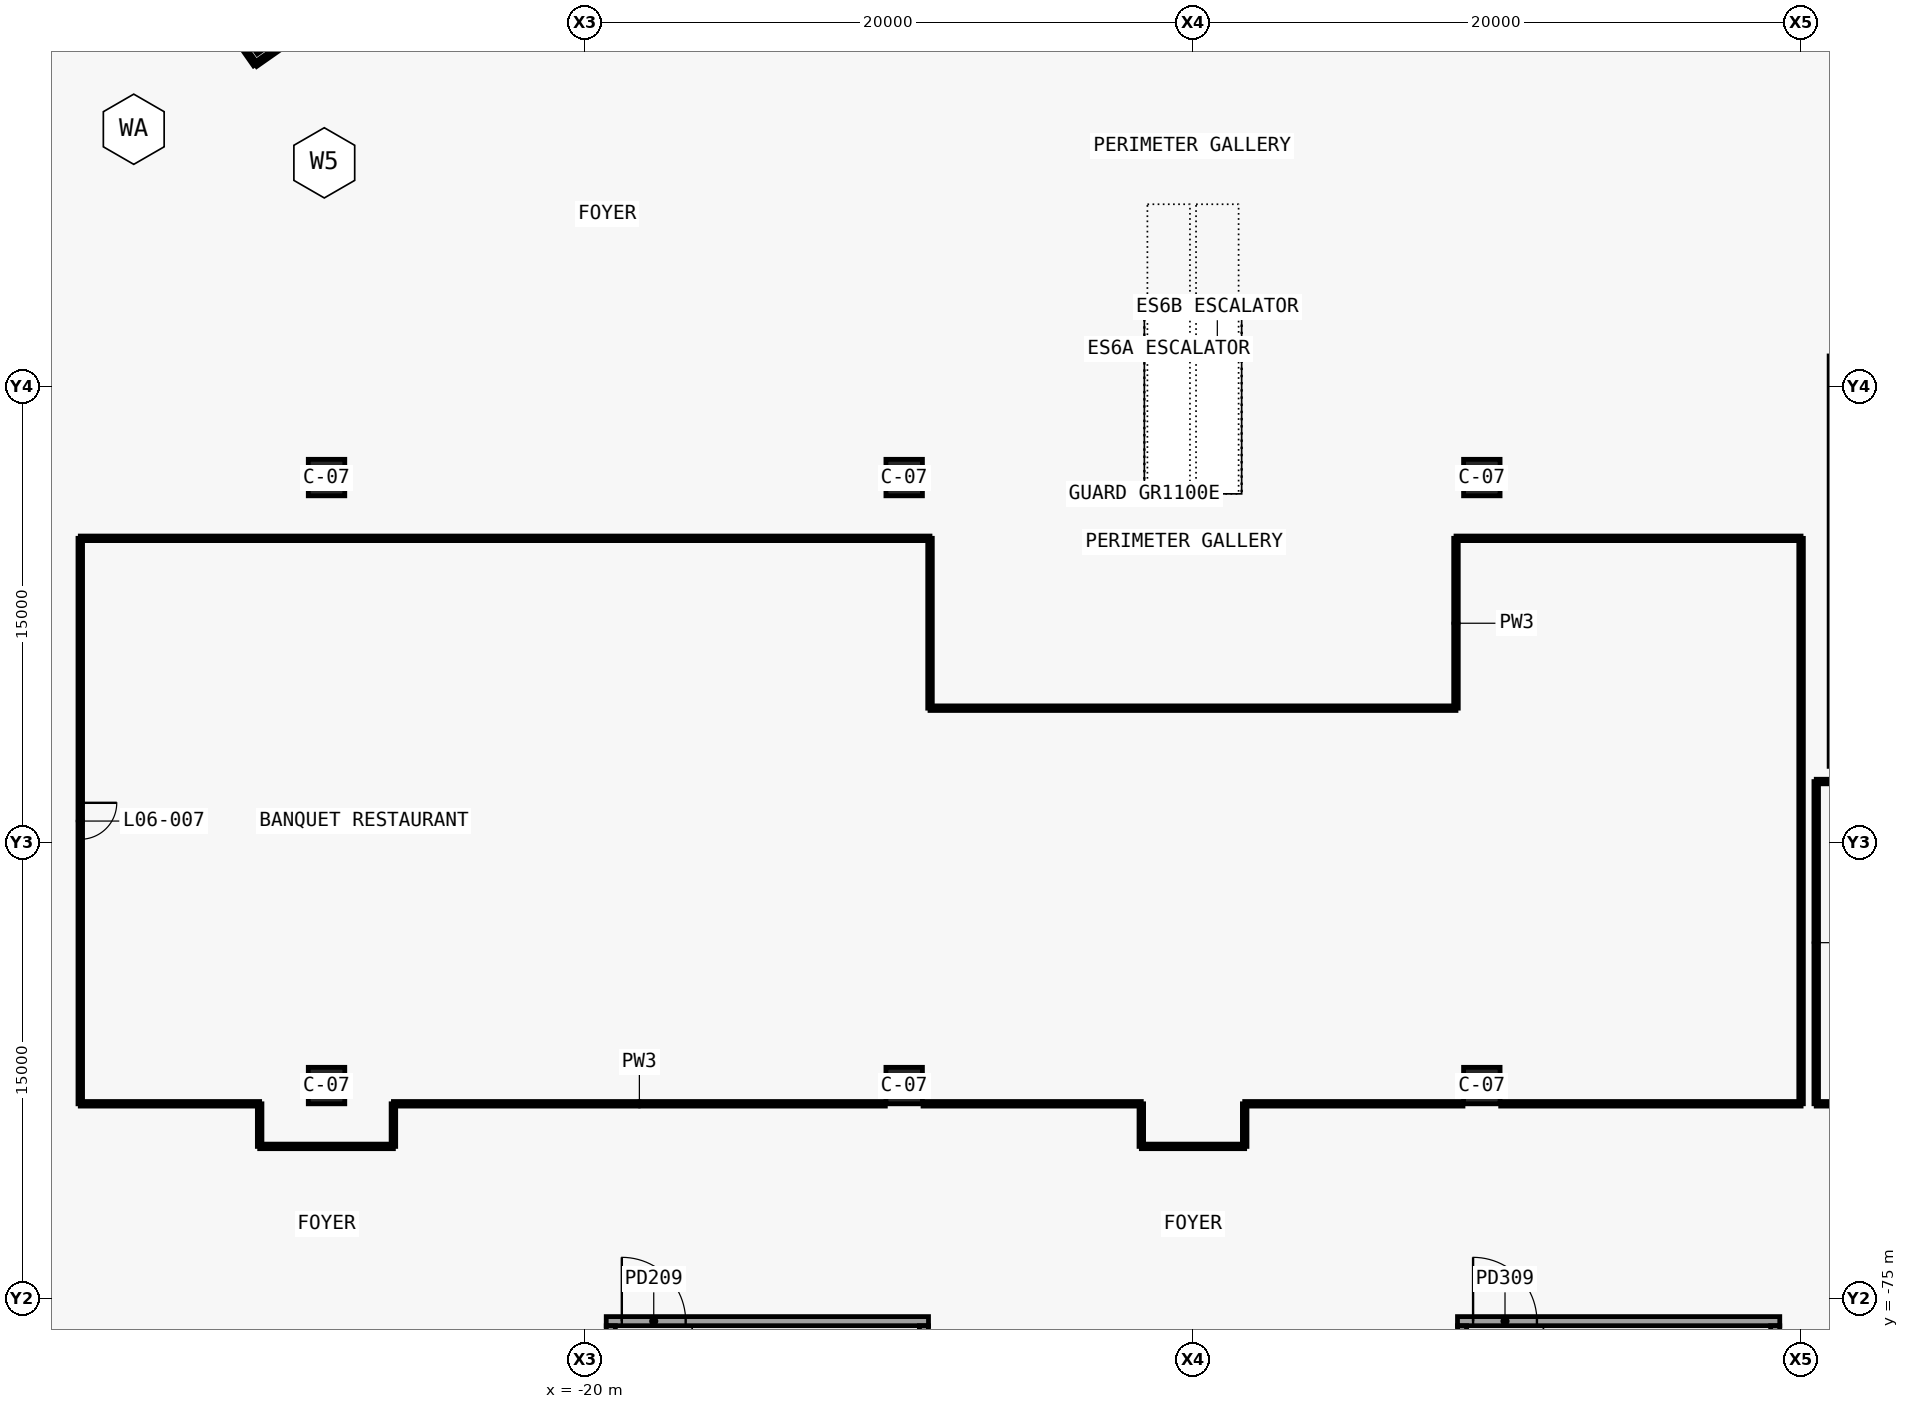
"""IFC4 building model, lengths in metres.
Left out: names, types, materials, properties, quantities, classifications, styles, units other than length and angle.
Written with IfcOpenShell. Run it as: python <this file> out.ifc"""

import sys

from ifc_helpers import new_model, si_unit, direction, frame, frame_2d, origin, origin_2d, place, context, subcontext, project, spatial, rectangle, extrude, element, fill, save


model = new_model("IFC4")
c1 = context("Model", 3, precision=1e-05, world=origin(), true_north=direction((0.0, 1.0)))
c2 = subcontext(c1, "Body", "Model", "MODEL_VIEW")
j1 = project(units=[si_unit("LENGTHUNIT", "METRE"), si_unit("PLANEANGLEUNIT", "RADIAN")], contexts=[c1])
p1 = place(None, origin())
s1 = spatial("IfcSite", under=j1, at=p1, CompositionType="ELEMENT")
p2 = place(p1, origin())
s2 = spatial("IfcBuilding", under=s1, at=p2, CompositionType="ELEMENT")
p3 = place(p2, frame((0.0, 0.0, 43.0)))
s3 = spatial("IfcBuildingStorey", under=s2, at=p3, CompositionType="ELEMENT", Elevation=43.0)
p4 = place(p3, frame((-19.3, -75.75, 0.0), z_axis=(0.0, 0.0, 1.0), x_axis=(1.0, 0.0, 0.0)))
e1 = element("IfcWall", 1, at=p4, inside=s3, PredefinedType="SOLIDWALL", context=c2, shape_type="SweptSolid", body=[
    extrude(rectangle(XDim=10.6, YDim=0.3, at=frame_2d((5.3, 0.0))), origin(), (0.0, 0.0, 1.0), 5.5),
])
p5 = place(p4, frame((0.512, 0.0, 0.0)))
e2 = element("IfcOpeningElement", 2, at=p5, cuts=e1, PredefinedType="OPENING", context=c2, shape_type="SweptSolid", body=[
    extrude(rectangle(XDim=2.1, YDim=2.1, at=frame_2d((1.05, 1.05))), frame((0.0, 0.16, 0.0), z_axis=(0.0, -1.0, 0.0), x_axis=(1.0, 0.0, 0.0)), (0.0, 0.0, 1.0), 0.32),
])
for number, where, z_axis, x_axis in (
    (3, (-19.15, -81.1, 0.0), (0.0, 0.0, 1.0), (0.0, 1.0, 0.0)),
    (4, (-8.85, -81.1, 0.0), (0.0, 0.0, 1.0), (0.0, 1.0, 0.0)),
):
    element("IfcWall", number, at=place(p3, frame(where, z_axis=z_axis, x_axis=x_axis)), inside=s3, PredefinedType="SOLIDWALL", context=c2, shape_type="SweptSolid", body=[
        extrude(rectangle(XDim=5.2, YDim=0.3, at=frame_2d((2.6, 0.0))), origin(), (0.0, 0.0, 1.0), 5.5),
    ])
p6 = place(p3, frame((8.7, -75.75, 0.0), z_axis=(0.0, 0.0, 1.0), x_axis=(1.0, 0.0, 0.0)))
e5 = element("IfcWall", 5, at=p6, inside=s3, PredefinedType="SOLIDWALL", context=c2, shape_type="SweptSolid", body=[
    extrude(rectangle(XDim=10.6, YDim=0.3, at=frame_2d((5.3, 0.0))), origin(), (0.0, 0.0, 1.0), 5.5),
])
p7 = place(p6, frame((0.512, 0.0, 0.0)))
e6 = element("IfcOpeningElement", 6, at=p7, cuts=e5, PredefinedType="OPENING", context=c2, shape_type="SweptSolid", body=[
    extrude(rectangle(XDim=2.1, YDim=2.1, at=frame_2d((1.05, 1.05))), frame((0.0, 0.16, 0.0), z_axis=(0.0, -1.0, 0.0), x_axis=(1.0, 0.0, 0.0)), (0.0, 0.0, 1.0), 0.32),
])
for number, where, z_axis, x_axis in (
    (7, (8.85, -81.1, 0.0), (0.0, 0.0, 1.0), (0.0, 1.0, 0.0)),
    (8, (19.15, -81.1, 0.0), (0.0, 0.0, 1.0), (0.0, 1.0, 0.0)),
):
    element("IfcWall", number, at=place(p3, frame(where, z_axis=z_axis, x_axis=x_axis)), inside=s3, PredefinedType="SOLIDWALL", context=c2, shape_type="SweptSolid", body=[
        extrude(rectangle(XDim=5.2, YDim=0.3, at=frame_2d((2.6, 0.0))), origin(), (0.0, 0.0, 1.0), 5.5),
    ])
p8 = place(p3, frame((-30.336, -33.388, 0.0), z_axis=(0.0, 0.0, 1.0), x_axis=(-0.819152044289, -0.573576436351, 0.0)))
e9 = element("IfcColumn", 9, at=p8, inside=s3, PredefinedType="COLUMN", context=c2, shape_type="SweptSolid", body=[
    extrude(rectangle(XDim=1.5, YDim=0.6, at=origin_2d()), origin(), (0.0, 0.0, 1.0), 5.5),
])
for number, where, z_axis, x_axis in (
    (10, (-28.5, -68.0, 0.0), (0.0, 0.0, 1.0), (1.0, 0.0, 0.0)),
    (11, (-9.5, -68.0, 0.0), (0.0, 0.0, 1.0), (1.0, 0.0, 0.0)),
    (12, (9.5, -68.0, 0.0), (0.0, 0.0, 1.0), (1.0, 0.0, 0.0)),
    (13, (-28.5, -48.0, 0.0), (0.0, 0.0, 1.0), (1.0, 0.0, 0.0)),
    (14, (-9.5, -48.0, 0.0), (0.0, 0.0, 1.0), (1.0, 0.0, 0.0)),
    (15, (9.5, -48.0, 0.0), (0.0, 0.0, 1.0), (1.0, 0.0, 0.0)),
):
    element("IfcColumn", number, at=place(p3, frame(where, z_axis=z_axis, x_axis=x_axis)), inside=s3, PredefinedType="COLUMN", context=c2, shape_type="SweptSolid", body=[
        extrude(rectangle(XDim=1.2, YDim=1.2, at=origin_2d()), origin(), (0.0, 0.0, 1.0), 5.5),
    ])
p9 = place(p3, frame((30.839, -34.412, 0.0), z_axis=(0.0, 0.0, 1.0), x_axis=(-0.819153188106, 0.573574802808, 0.0)))
e16 = element("IfcWall", 16, at=p9, inside=s3, PredefinedType="PARTITIONING", context=c2, shape_type="SweptSolid", body=[
    extrude(rectangle(XDim=25.351, YDim=0.15, at=frame_2d((12.675, 0.0))), origin(), (0.0, 0.0, 1.0), 4.08),
])
p10 = place(p3, frame((20.001, -68.599, 0.0), z_axis=(0.0, 0.0, 1.0), x_axis=(0.0, 1.0, 0.0)))
e17 = element("IfcWall", 17, at=p10, inside=s3, PredefinedType="PARTITIONING", context=c2, shape_type="SweptSolid", body=[
    extrude(rectangle(XDim=18.599, YDim=0.15, at=frame_2d((9.3, 0.0))), origin(), (0.0, 0.0, 1.0), 4.28),
])
p11 = place(p3, frame((20.0, -49.999, 0.0), z_axis=(0.0, 0.0, 1.0), x_axis=(-1.0, 0.0, 0.0)))
e18 = element("IfcWall", 18, at=p11, inside=s3, PredefinedType="PARTITIONING", context=c2, shape_type="SweptSolid", body=[
    extrude(rectangle(XDim=11.349, YDim=0.15, at=frame_2d((5.675, 0.0))), origin(), (0.0, 0.0, 1.0), 4.28),
])
p12 = place(p3, frame((-8.651, -49.999, 0.0), z_axis=(0.0, 0.0, 1.0), x_axis=(-1.0, 0.0, 0.0)))
e19 = element("IfcWall", 19, at=p12, inside=s3, PredefinedType="PARTITIONING", context=c2, shape_type="SweptSolid", body=[
    extrude(rectangle(XDim=27.948, YDim=0.15, at=frame_2d((13.974, 0.0))), origin(), (0.0, 0.0, 1.0), 4.28),
])
p13 = place(p3, frame((36.599, -57.999, 0.0), z_axis=(0.0, 0.0, 1.0), x_axis=(-1.0, 0.0, 0.0)))
e20 = element("IfcWall", 20, at=p13, inside=s3, PredefinedType="PARTITIONING", context=c2, shape_type="SweptSolid", body=[
    extrude(rectangle(XDim=16.099, YDim=0.15, at=frame_2d((8.05, 0.0))), origin(), (0.0, 0.0, 1.0), 4.28),
])
p14 = place(p3, frame((20.499, -58.0, 0.0), z_axis=(0.0, 0.0, 1.0), x_axis=(0.0, -1.0, 0.0)))
e21 = element("IfcWall", 21, at=p14, inside=s3, PredefinedType="PARTITIONING", context=c2, shape_type="SweptSolid", body=[
    extrude(rectangle(XDim=10.599, YDim=0.15, at=frame_2d((5.3, 0.0))), origin(), (0.0, 0.0, 1.0), 4.28),
])
p15 = place(p3, frame((20.999, -44.0, 0.0), z_axis=(0.0, 0.0, 1.0), x_axis=(0.0, -1.0, 0.0)))
e22 = element("IfcWall", 22, at=p15, inside=s3, PredefinedType="PARTITIONING", context=c2, shape_type="SweptSolid", body=[
    extrude(rectangle(XDim=13.5, YDim=0.15, at=frame_2d((6.75, 0.0))), origin(), (0.0, 0.0, 1.0), 4.28),
])
p16 = place(p3, frame((-32.56, -31.956, 0.0), z_axis=(0.0, 0.0, 1.0), x_axis=(0.573604390867, -0.819132469615, 0.0)))
e23 = element("IfcWall", 23, at=p16, inside=s3, PredefinedType="PARTITIONING", context=c2, shape_type="SweptSolid", body=[
    extrude(rectangle(XDim=2.999, YDim=0.15, at=frame_2d((1.5, 0.0))), origin(), (0.0, 0.0, 1.0), 4.4),
])
p17 = place(p3, frame((-30.839, -34.413, 0.0), z_axis=(0.0, 0.0, 1.0), x_axis=(0.819149083218, 0.573580665175, 0.0)))
e24 = element("IfcWall", 24, at=p17, inside=s3, PredefinedType="PARTITIONING", context=c2, shape_type="SweptSolid", body=[
    extrude(rectangle(XDim=18.002, YDim=0.15, at=frame_2d((9.001, 0.0))), origin(), (0.0, 0.0, 1.0), 5.1),
])
p18 = place(p3, frame((-1.699, -70.001, 0.0), z_axis=(0.0, 0.0, 1.0), x_axis=(1.0, 0.0, 0.0)))
e25 = element("IfcWall", 25, at=p18, inside=s3, PredefinedType="PARTITIONING", context=c2, shape_type="SweptSolid", body=[
    extrude(rectangle(XDim=3.398, YDim=0.15, at=frame_2d((1.699, 0.0))), origin(), (0.0, 0.0, 1.0), 5.1),
])
p19 = place(p3, frame((-30.699, -70.001, 0.0), z_axis=(0.0, 0.0, 1.0), x_axis=(1.0, 0.0, 0.0)))
e26 = element("IfcWall", 26, at=p19, inside=s3, PredefinedType="PARTITIONING", context=c2, shape_type="SweptSolid", body=[
    extrude(rectangle(XDim=4.398, YDim=0.15, at=frame_2d((2.199, 0.0))), origin(), (0.0, 0.0, 1.0), 4.28),
])
p20 = place(p3, frame((-36.6, -49.998, 0.0), z_axis=(0.0, 0.0, 1.0), x_axis=(0.0, -1.0, 0.0)))
e27 = element("IfcWall", 27, at=p20, inside=s3, PredefinedType="PARTITIONING", context=c2, shape_type="SweptSolid", body=[
    extrude(rectangle(XDim=18.602, YDim=0.15, at=frame_2d((9.301, 0.0))), origin(), (0.0, 0.0, 1.0), 4.28),
])
p21 = place(p20, frame((8.701, 0.0, 0.0)))
e28 = element("IfcOpeningElement", 28, at=p21, cuts=e27, PredefinedType="OPENING", context=c2, shape_type="SweptSolid", body=[
    extrude(rectangle(XDim=1.2, YDim=2.4, at=frame_2d((0.6, 1.2))), frame((0.0, 0.085, 0.0), z_axis=(0.0, -1.0, 0.0), x_axis=(1.0, 0.0, 0.0)), (0.0, 0.0, 1.0), 0.17),
])
p22 = place(p3, frame((-36.6, -68.6, 0.0), z_axis=(0.0, 0.0, 1.0), x_axis=(1.0, 0.0, 0.0)))
e29 = element("IfcWall", 29, at=p22, inside=s3, PredefinedType="PARTITIONING", context=c2, shape_type="SweptSolid", body=[
    extrude(rectangle(XDim=5.9, YDim=0.15, at=frame_2d((2.95, 0.0))), origin(), (0.0, 0.0, 1.0), 5.1),
])
for number, where, z_axis, x_axis in (
    (30, (-30.7, -68.6, 0.0), (0.0, 0.0, 1.0), (0.0, -1.0, 0.0)),
    (31, (-26.3, -70.002, 0.0), (0.0, 0.0, 1.0), (0.0, 1.0, 0.0)),
):
    element("IfcWall", number, at=place(p3, frame(where, z_axis=z_axis, x_axis=x_axis)), inside=s3, PredefinedType="PARTITIONING", context=c2, shape_type="SweptSolid", body=[
        extrude(rectangle(XDim=1.402, YDim=0.15, at=frame_2d((0.701, 0.0))), origin(), (0.0, 0.0, 1.0), 5.1),
    ])
p23 = place(p3, frame((-26.3, -68.6, 0.0), z_axis=(0.0, 0.0, 1.0), x_axis=(1.0, 0.0, 0.0)))
e32 = element("IfcWall", 32, at=p23, inside=s3, PredefinedType="PARTITIONING", context=c2, shape_type="SweptSolid", body=[
    extrude(rectangle(XDim=16.18, YDim=0.15, at=frame_2d((8.09, 0.0))), origin(), (0.0, 0.0, 1.0), 5.1),
])
p24 = place(p3, frame((-8.88, -68.6, 0.0), z_axis=(0.0, 0.0, 1.0), x_axis=(1.0, 0.0, 0.0)))
e33 = element("IfcWall", 33, at=p24, inside=s3, PredefinedType="PARTITIONING", context=c2, shape_type="SweptSolid", body=[
    extrude(rectangle(XDim=7.18, YDim=0.15, at=frame_2d((3.59, 0.0))), origin(), (0.0, 0.0, 1.0), 5.1),
])
for number, where, z_axis, x_axis in (
    (34, (-1.7, -68.6, 0.0), (0.0, 0.0, 1.0), (0.0, -1.0, 0.0)),
    (35, (1.7, -70.002, 0.0), (0.0, 0.0, 1.0), (0.0, 1.0, 0.0)),
):
    element("IfcWall", number, at=place(p3, frame(where, z_axis=z_axis, x_axis=x_axis)), inside=s3, PredefinedType="PARTITIONING", context=c2, shape_type="SweptSolid", body=[
        extrude(rectangle(XDim=1.402, YDim=0.15, at=frame_2d((0.701, 0.0))), origin(), (0.0, 0.0, 1.0), 5.1),
    ])
p25 = place(p3, frame((1.7, -68.6, 0.0), z_axis=(0.0, 0.0, 1.0), x_axis=(1.0, 0.0, 0.0)))
e36 = element("IfcWall", 36, at=p25, inside=s3, PredefinedType="PARTITIONING", context=c2, shape_type="SweptSolid", body=[
    extrude(rectangle(XDim=7.18, YDim=0.15, at=frame_2d((3.59, 0.0))), origin(), (0.0, 0.0, 1.0), 5.1),
])
p26 = place(p3, frame((10.12, -68.6, 0.0), z_axis=(0.0, 0.0, 1.0), x_axis=(1.0, 0.0, 0.0)))
e37 = element("IfcWall", 37, at=p26, inside=s3, PredefinedType="PARTITIONING", context=c2, shape_type="SweptSolid", body=[
    extrude(rectangle(XDim=9.882, YDim=0.15, at=frame_2d((4.941, 0.0))), origin(), (0.0, 0.0, 1.0), 5.1),
])
p27 = place(p3, frame((20.498, -68.6, 0.0), z_axis=(0.0, 0.0, 1.0), x_axis=(1.0, 0.0, 0.0)))
e38 = element("IfcWall", 38, at=p27, inside=s3, PredefinedType="PARTITIONING", context=c2, shape_type="SweptSolid", body=[
    extrude(rectangle(XDim=5.802, YDim=0.15, at=frame_2d((2.901, 0.0))), origin(), (0.0, 0.0, 1.0), 5.1),
])
p28 = place(p27, frame((2.451, 0.0, 0.0)))
e39 = element("IfcOpeningElement", 39, at=p28, cuts=e38, PredefinedType="OPENING", context=c2, shape_type="SweptSolid", body=[
    extrude(rectangle(XDim=0.9, YDim=2.1, at=frame_2d((0.45, 1.05))), frame((0.0, 0.085, 0.0), z_axis=(0.0, -1.0, 0.0), x_axis=(1.0, 0.0, 0.0)), (0.0, 0.0, 1.0), 0.17),
])
p29 = place(p3, frame((8.65, -55.586, 0.0), z_axis=(0.0, 0.0, 1.0), x_axis=(-1.0, 0.0, 0.0)))
e40 = element("IfcWall", 40, at=p29, inside=s3, PredefinedType="PARTITIONING", context=c2, shape_type="SweptSolid", body=[
    extrude(rectangle(XDim=17.3, YDim=0.15, at=frame_2d((8.65, 0.0))), origin(), (0.0, 0.0, 1.0), 5.1),
])
for number, where, z_axis, x_axis in (
    (41, (-8.65, -55.586, 0.0), (0.0, 0.0, 1.0), (0.0, 1.0, 0.0)),
    (42, (8.65, -49.998, 0.0), (0.0, 0.0, 1.0), (0.0, -1.0, 0.0)),
):
    element("IfcWall", number, at=place(p3, frame(where, z_axis=z_axis, x_axis=x_axis)), inside=s3, PredefinedType="PARTITIONING", context=c2, shape_type="SweptSolid", body=[
        extrude(rectangle(XDim=5.588, YDim=0.15, at=frame_2d((2.794, 0.0))), origin(), (0.0, 0.0, 1.0), 4.63),
    ])
p30 = place(p5, origin())
e43 = element("IfcDoor", 43, at=p30, inside=s3, OperationType="DOUBLE_DOOR_SINGLE_SWING", PredefinedType="DOOR", context=c2, shape_type="SweptSolid", body=[
    extrude(rectangle(XDim=2.1, YDim=2.1, at=frame_2d((1.05, 1.05))), frame((0.0, 0.025, 0.0), z_axis=(0.0, -1.0, 0.0), x_axis=(1.0, 0.0, 0.0)), (0.0, 0.0, 1.0), 0.05),
])
fill(e2, e43)
p31 = place(p7, origin())
e44 = element("IfcDoor", 44, at=p31, inside=s3, OperationType="DOUBLE_DOOR_SINGLE_SWING", PredefinedType="DOOR", context=c2, shape_type="SweptSolid", body=[
    extrude(rectangle(XDim=2.1, YDim=2.1, at=frame_2d((1.05, 1.05))), frame((0.0, 0.025, 0.0), z_axis=(0.0, -1.0, 0.0), x_axis=(1.0, 0.0, 0.0)), (0.0, 0.0, 1.0), 0.05),
])
fill(e6, e44)
p32 = place(p21, origin())
e45 = element("IfcDoor", 45, at=p32, inside=s3, OperationType="DOUBLE_DOOR_SINGLE_SWING", PredefinedType="DOOR", context=c2, shape_type="SweptSolid", body=[
    extrude(rectangle(XDim=1.2, YDim=2.4, at=frame_2d((0.6, 1.2))), frame((0.0, 0.025, 0.0), z_axis=(0.0, -1.0, 0.0), x_axis=(1.0, 0.0, 0.0)), (0.0, 0.0, 1.0), 0.05),
])
fill(e28, e45)
save(model, sys.argv[1])
